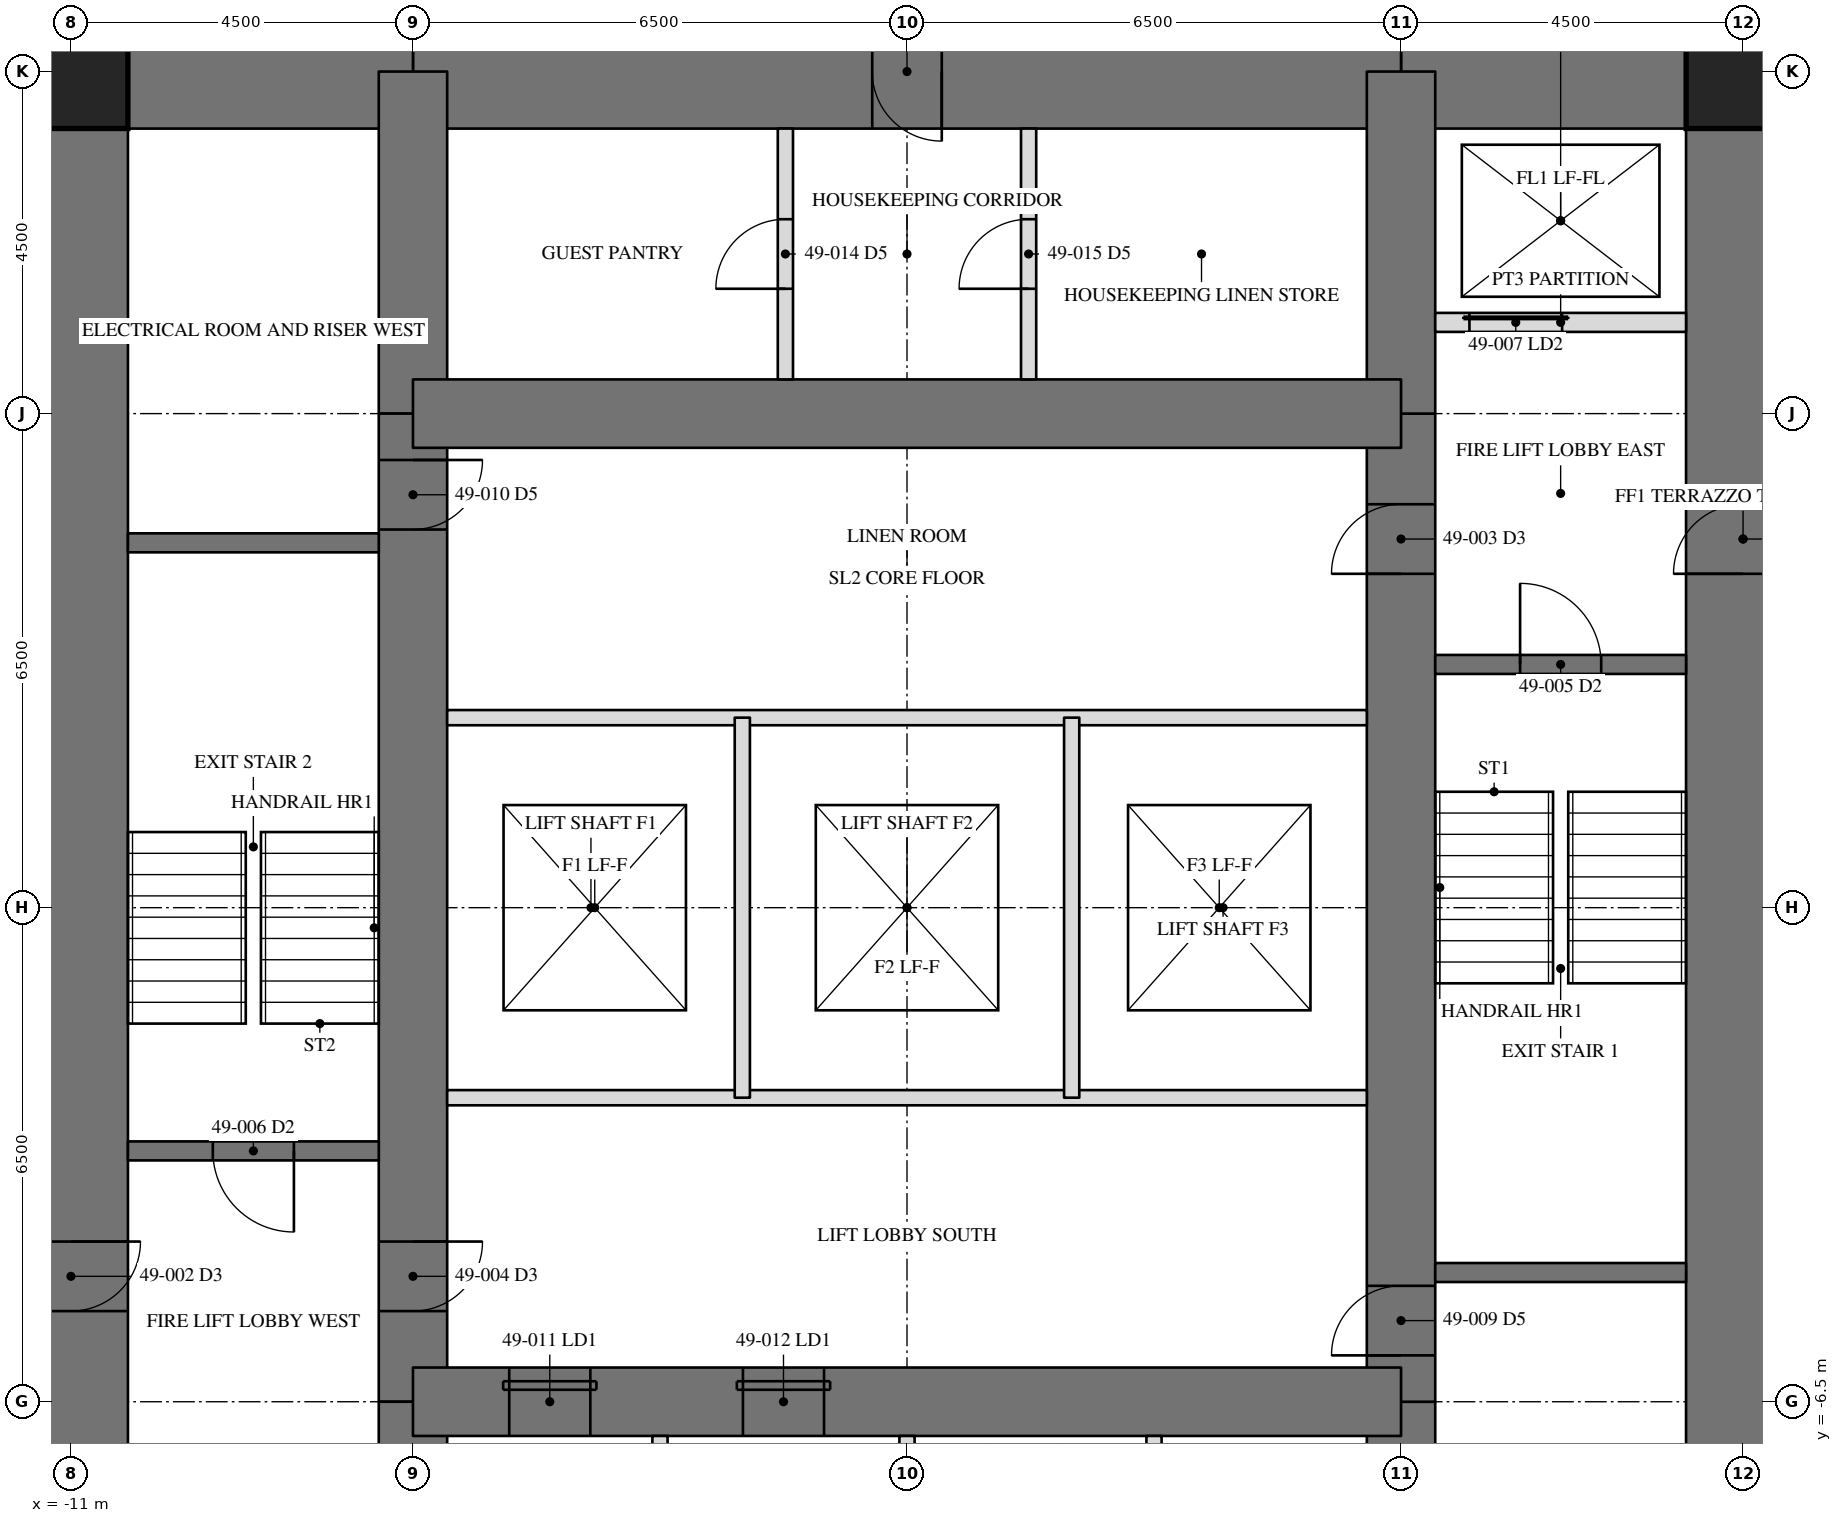
"""IFC4 building model, lengths in metres.
Left out: names, types, materials, properties, quantities, classifications, styles, units other than length and angle.
Written with IfcOpenShell. Run it as: python <this file> out.ifc"""

import sys

from ifc_helpers import new_model, si_unit, direction, frame, frame_2d, origin, origin_2d, place, context, subcontext, project, spatial, rectangle, hollow_rectangle, extrude, element, fill, save


model = new_model("IFC4")
c1 = context("Model", 3, precision=1e-05, world=origin(), true_north=direction((0.0, 1.0)))
c2 = subcontext(c1, "Body", "Model", "MODEL_VIEW")
j1 = project(units=[si_unit("LENGTHUNIT", "METRE"), si_unit("PLANEANGLEUNIT", "RADIAN")], contexts=[c1])
p1 = place(None, origin())
s1 = spatial("IfcSite", under=j1, at=p1, CompositionType="ELEMENT")
p2 = place(p1, origin())
s2 = spatial("IfcBuilding", under=s1, at=p2, CompositionType="ELEMENT")
p3 = place(p2, frame((0.0, 0.0, 208.2)))
s3 = spatial("IfcBuildingStorey", under=s2, at=p3, CompositionType="ELEMENT", Elevation=208.2)
p4 = place(p3, frame((11.0, -11.0, 0.0), z_axis=(0.0, 0.0, 1.0), x_axis=(0.0, 1.0, 0.0)))
e1 = element("IfcWall", 1, at=p4, inside=s3, PredefinedType="SHEAR", context=c2, shape_type="SweptSolid", body=[
    extrude(rectangle(XDim=22.0, YDim=1.5, at=frame_2d((11.0, 0.0))), origin(), (0.0, 0.0, 1.0), 3.5),
])
p5 = place(p4, frame((15.393, 0.0, 0.0)))
e2 = element("IfcOpeningElement", 2, at=p5, cuts=e1, PredefinedType="OPENING", context=c2, shape_type="SweptSolid", body=[
    extrude(rectangle(XDim=0.915, YDim=2.134, at=frame_2d((0.458, 1.067))), frame((0.0, 0.76, 0.0), z_axis=(0.0, -1.0, 0.0), x_axis=(1.0, 0.0, 0.0)), (0.0, 0.0, 1.0), 1.52),
])
p6 = place(p3, frame((-11.0, 11.0, 0.0), z_axis=(0.0, 0.0, 1.0), x_axis=(0.0, -1.0, 0.0)))
e3 = element("IfcWall", 3, at=p6, inside=s3, PredefinedType="SHEAR", context=c2, shape_type="SweptSolid", body=[
    extrude(rectangle(XDim=22.0, YDim=1.5, at=frame_2d((11.0, 0.0))), origin(), (0.0, 0.0, 1.0), 3.5),
])
p7 = place(p6, frame((15.393, 0.0, 0.0)))
e4 = element("IfcOpeningElement", 4, at=p7, cuts=e3, PredefinedType="OPENING", context=c2, shape_type="SweptSolid", body=[
    extrude(rectangle(XDim=0.915, YDim=2.134, at=frame_2d((0.458, 1.067))), frame((0.0, 0.76, 0.0), z_axis=(0.0, -1.0, 0.0), x_axis=(1.0, 0.0, 0.0)), (0.0, 0.0, 1.0), 1.52),
])
p8 = place(p3, frame((11.0, 11.0, 0.0), z_axis=(0.0, 0.0, 1.0), x_axis=(-1.0, 0.0, 0.0)))
e5 = element("IfcWall", 5, at=p8, inside=s3, PredefinedType="SHEAR", context=c2, shape_type="SweptSolid", body=[
    extrude(rectangle(XDim=4.5, YDim=1.5, at=frame_2d((2.25, 0.0))), origin(), (0.0, 0.0, 1.0), 3.5),
])
p9 = place(p3, frame((6.5, 11.0, 0.0), z_axis=(0.0, 0.0, 1.0), x_axis=(-1.0, 0.0, 0.0)))
e6 = element("IfcWall", 6, at=p9, inside=s3, PredefinedType="SHEAR", context=c2, shape_type="SweptSolid", body=[
    extrude(rectangle(XDim=13.0, YDim=1.5, at=frame_2d((6.5, 0.0))), origin(), (0.0, 0.0, 1.0), 3.5),
])
p10 = place(p9, frame((6.042, 0.0, 0.0)))
e7 = element("IfcOpeningElement", 7, at=p10, cuts=e6, PredefinedType="OPENING", context=c2, shape_type="SweptSolid", body=[
    extrude(rectangle(XDim=0.915, YDim=2.134, at=frame_2d((0.458, 1.067))), frame((0.0, 0.76, 0.0), z_axis=(0.0, -1.0, 0.0), x_axis=(1.0, 0.0, 0.0)), (0.0, 0.0, 1.0), 1.52),
])
p11 = place(p3, frame((-6.5, 11.0, 0.0), z_axis=(0.0, 0.0, 1.0), x_axis=(-1.0, 0.0, 0.0)))
e8 = element("IfcWall", 8, at=p11, inside=s3, PredefinedType="SHEAR", context=c2, shape_type="SweptSolid", body=[
    extrude(rectangle(XDim=4.5, YDim=1.5, at=frame_2d((2.25, 0.0))), origin(), (0.0, 0.0, 1.0), 3.5),
])
p12 = place(p3, frame((6.5, -11.0, 0.0), z_axis=(0.0, 0.0, 1.0), x_axis=(0.0, 1.0, 0.0)))
e9 = element("IfcWall", 9, at=p12, inside=s3, PredefinedType="SHEAR", context=c2, shape_type="SweptSolid", body=[
    extrude(rectangle(XDim=4.5, YDim=0.9, at=frame_2d((2.25, 0.0))), origin(), (0.0, 0.0, 1.0), 3.5),
])
p13 = place(p3, frame((6.5, -6.5, 0.0), z_axis=(0.0, 0.0, 1.0), x_axis=(0.0, 1.0, 0.0)))
e10 = element("IfcWall", 10, at=p13, inside=s3, PredefinedType="SHEAR", context=c2, shape_type="SweptSolid", body=[
    extrude(rectangle(XDim=13.0, YDim=0.9, at=frame_2d((6.5, 0.0))), origin(), (0.0, 0.0, 1.0), 3.5),
])
p14 = place(p13, frame((10.893, 0.0, 0.0)))
e11 = element("IfcOpeningElement", 11, at=p14, cuts=e10, PredefinedType="OPENING", context=c2, shape_type="SweptSolid", body=[
    extrude(rectangle(XDim=0.915, YDim=2.134, at=frame_2d((0.458, 1.067))), frame((0.0, 0.46, 0.0), z_axis=(0.0, -1.0, 0.0), x_axis=(1.0, 0.0, 0.0)), (0.0, 0.0, 1.0), 0.92),
])
p15 = place(p13, frame((0.61, 0.0, 0.0)))
e12 = element("IfcOpeningElement", 12, at=p15, cuts=e10, PredefinedType="OPENING", context=c2, shape_type="SweptSolid", body=[
    extrude(rectangle(XDim=0.915, YDim=2.134, at=frame_2d((0.458, 1.067))), frame((0.0, 0.46, 0.0), z_axis=(0.0, -1.0, 0.0), x_axis=(1.0, 0.0, 0.0)), (0.0, 0.0, 1.0), 0.92),
])
for number, where, z_axis, x_axis in (
    (13, (6.5, 6.5, 0.0), (0.0, 0.0, 1.0), (0.0, 1.0, 0.0)),
    (14, (-6.5, 11.0, 0.0), (0.0, 0.0, 1.0), (0.0, -1.0, 0.0)),
):
    element("IfcWall", number, at=place(p3, frame(where, z_axis=z_axis, x_axis=x_axis)), inside=s3, PredefinedType="SHEAR", context=c2, shape_type="SweptSolid", body=[
        extrude(rectangle(XDim=4.5, YDim=0.9, at=frame_2d((2.25, 0.0))), origin(), (0.0, 0.0, 1.0), 3.5),
    ])
p16 = place(p3, frame((-6.5, 6.5, 0.0), z_axis=(0.0, 0.0, 1.0), x_axis=(0.0, -1.0, 0.0)))
e15 = element("IfcWall", 15, at=p16, inside=s3, PredefinedType="SHEAR", context=c2, shape_type="SweptSolid", body=[
    extrude(rectangle(XDim=13.0, YDim=0.9, at=frame_2d((6.5, 0.0))), origin(), (0.0, 0.0, 1.0), 3.5),
])
p17 = place(p16, frame((10.893, 0.0, 0.0)))
e16 = element("IfcOpeningElement", 16, at=p17, cuts=e15, PredefinedType="OPENING", context=c2, shape_type="SweptSolid", body=[
    extrude(rectangle(XDim=0.915, YDim=2.134, at=frame_2d((0.458, 1.067))), frame((0.0, 0.46, 0.0), z_axis=(0.0, -1.0, 0.0), x_axis=(1.0, 0.0, 0.0)), (0.0, 0.0, 1.0), 0.92),
])
p18 = place(p16, frame((0.61, 0.0, 0.0)))
e17 = element("IfcOpeningElement", 17, at=p18, cuts=e15, PredefinedType="OPENING", context=c2, shape_type="SweptSolid", body=[
    extrude(rectangle(XDim=0.915, YDim=2.134, at=frame_2d((0.458, 1.067))), frame((0.0, 0.46, 0.0), z_axis=(0.0, -1.0, 0.0), x_axis=(1.0, 0.0, 0.0)), (0.0, 0.0, 1.0), 0.92),
])
p19 = place(p3, frame((-6.5, -6.5, 0.0), z_axis=(0.0, 0.0, 1.0), x_axis=(0.0, -1.0, 0.0)))
e18 = element("IfcWall", 18, at=p19, inside=s3, PredefinedType="SHEAR", context=c2, shape_type="SweptSolid", body=[
    extrude(rectangle(XDim=4.5, YDim=0.9, at=frame_2d((2.25, 0.0))), origin(), (0.0, 0.0, 1.0), 3.5),
])
p20 = place(p3, frame((6.5, 6.5, 0.0), z_axis=(0.0, 0.0, 1.0), x_axis=(-1.0, 0.0, 0.0)))
e19 = element("IfcWall", 19, at=p20, inside=s3, PredefinedType="SHEAR", context=c2, shape_type="SweptSolid", body=[
    extrude(rectangle(XDim=13.0, YDim=0.9, at=frame_2d((6.5, 0.0))), origin(), (0.0, 0.0, 1.0), 3.5),
])
p21 = place(p3, frame((-6.5, -6.5, 0.0), z_axis=(0.0, 0.0, 1.0), x_axis=(1.0, 0.0, 0.0)))
e20 = element("IfcWall", 20, at=p21, inside=s3, PredefinedType="SHEAR", context=c2, shape_type="SweptSolid", body=[
    extrude(rectangle(XDim=13.0, YDim=0.9, at=frame_2d((6.5, 0.0))), origin(), (0.0, 0.0, 1.0), 3.5),
])
p22 = place(p21, frame((1.267, 0.0, 0.0)))
e21 = element("IfcOpeningElement", 21, at=p22, cuts=e20, PredefinedType="OPENING", context=c2, shape_type="SweptSolid", body=[
    extrude(rectangle(XDim=1.067, YDim=2.134, at=frame_2d((0.533, 1.067))), frame((0.0, 0.46, 0.0), z_axis=(0.0, -1.0, 0.0), x_axis=(1.0, 0.0, 0.0)), (0.0, 0.0, 1.0), 0.92),
])
p23 = place(p21, frame((4.342, 0.0, 0.0)))
e22 = element("IfcOpeningElement", 22, at=p23, cuts=e20, PredefinedType="OPENING", context=c2, shape_type="SweptSolid", body=[
    extrude(rectangle(XDim=1.067, YDim=2.134, at=frame_2d((0.533, 1.067))), frame((0.0, 0.46, 0.0), z_axis=(0.0, -1.0, 0.0), x_axis=(1.0, 0.0, 0.0)), (0.0, 0.0, 1.0), 0.92),
])
for number, where, z_axis, x_axis in (
    (23, (11.0, 11.0, 0.0), (0.0, 0.0, 1.0), (1.0, 0.0, 0.0)),
    (24, (-11.0, 11.0, 0.0), (0.0, 0.0, 1.0), (1.0, 0.0, 0.0)),
):
    element("IfcColumn", number, at=place(p3, frame(where, z_axis=z_axis, x_axis=x_axis)), inside=s3, PredefinedType="COLUMN", context=c2, shape_type="SweptSolid", body=[
        extrude(hollow_rectangle(XDim=1.499, YDim=1.499, WallThickness=0.102, at=origin_2d()), origin(), (0.0, 0.0, 1.0), 3.5),
    ])
for number, where, z_axis, x_axis in (
    (25, (6.95, -4.8, 0.0), (0.0, 0.0, 1.0), (1.0, 0.0, 0.0)),
    (26, (-6.95, 4.8, 0.0), (0.0, 0.0, 1.0), (-1.0, 0.0, 0.0)),
):
    element("IfcWall", number, at=place(p3, frame(where, z_axis=z_axis, x_axis=x_axis)), inside=s3, PredefinedType="SOLIDWALL", context=c2, shape_type="SweptSolid", body=[
        extrude(rectangle(XDim=3.3, YDim=0.25, at=frame_2d((1.65, 0.0))), origin(), (0.0, 0.0, 1.0), 3.31),
    ])
p24 = place(p3, frame((6.95, 3.2, 0.0), z_axis=(0.0, 0.0, 1.0), x_axis=(1.0, 0.0, 0.0)))
e27 = element("IfcWall", 27, at=p24, inside=s3, PredefinedType="SOLIDWALL", context=c2, shape_type="SweptSolid", body=[
    extrude(rectangle(XDim=3.3, YDim=0.25, at=frame_2d((1.65, 0.0))), origin(), (0.0, 0.0, 1.0), 3.31),
])
p25 = place(p24, frame((1.116, 0.0, 0.0)))
e28 = element("IfcOpeningElement", 28, at=p25, cuts=e27, PredefinedType="OPENING", context=c2, shape_type="SweptSolid", body=[
    extrude(rectangle(XDim=1.067, YDim=2.134, at=frame_2d((0.533, 1.067))), frame((0.0, 0.135, 0.0), z_axis=(0.0, -1.0, 0.0), x_axis=(1.0, 0.0, 0.0)), (0.0, 0.0, 1.0), 0.27),
])
p26 = place(p3, frame((-6.95, -3.2, 0.0), z_axis=(0.0, 0.0, 1.0), x_axis=(-1.0, 0.0, 0.0)))
e29 = element("IfcWall", 29, at=p26, inside=s3, PredefinedType="SOLIDWALL", context=c2, shape_type="SweptSolid", body=[
    extrude(rectangle(XDim=3.3, YDim=0.25, at=frame_2d((1.65, 0.0))), origin(), (0.0, 0.0, 1.0), 3.31),
])
p27 = place(p26, frame((1.116, 0.0, 0.0)))
e30 = element("IfcOpeningElement", 30, at=p27, cuts=e29, PredefinedType="OPENING", context=c2, shape_type="SweptSolid", body=[
    extrude(rectangle(XDim=1.067, YDim=2.134, at=frame_2d((0.533, 1.067))), frame((0.0, 0.135, 0.0), z_axis=(0.0, -1.0, 0.0), x_axis=(1.0, 0.0, 0.0)), (0.0, 0.0, 1.0), 0.27),
])
p28 = place(p3, frame((6.95, 7.7, 0.0), z_axis=(0.0, 0.0, 1.0), x_axis=(1.0, 0.0, 0.0)))
e31 = element("IfcWall", 31, at=p28, inside=s3, PredefinedType="PARTITIONING", context=c2, shape_type="SweptSolid", body=[
    extrude(rectangle(XDim=3.3, YDim=0.25, at=frame_2d((1.65, 0.0))), origin(), (0.0, 0.0, 1.0), 3.31),
])
p29 = place(p28, frame((0.45, 0.0, 0.0)))
e32 = element("IfcOpeningElement", 32, at=p29, cuts=e31, PredefinedType="OPENING", context=c2, shape_type="SweptSolid", body=[
    extrude(rectangle(XDim=1.219, YDim=2.134, at=frame_2d((0.609, 1.067))), frame((0.0, 0.135, 0.0), z_axis=(0.0, -1.0, 0.0), x_axis=(1.0, 0.0, 0.0)), (0.0, 0.0, 1.0), 0.27),
])
for number, where, z_axis, x_axis in (
    (33, (-6.05, 2.5, 0.0), (0.0, 0.0, 1.0), (1.0, 0.0, 0.0)),
    (34, (6.05, -2.5, 0.0), (0.0, 0.0, 1.0), (-1.0, 0.0, 0.0)),
):
    element("IfcWall", number, at=place(p3, frame(where, z_axis=z_axis, x_axis=x_axis)), inside=s3, PredefinedType="PARTITIONING", context=c2, shape_type="SweptSolid", body=[
        extrude(rectangle(XDim=12.1, YDim=0.2, at=frame_2d((6.05, 0.0))), origin(), (0.0, 0.0, 1.0), 3.31),
    ])
for number, where, z_axis, x_axis in (
    (35, (-3.25, -10.25, 0.0), (0.0, 0.0, 1.0), (0.0, 1.0, 0.0)),
    (36, (0.0, -10.25, 0.0), (0.0, 0.0, 1.0), (0.0, 1.0, 0.0)),
    (37, (3.25, -10.25, 0.0), (0.0, 0.0, 1.0), (0.0, 1.0, 0.0)),
):
    element("IfcWall", number, at=place(p3, frame(where, z_axis=z_axis, x_axis=x_axis)), inside=s3, PredefinedType="PARTITIONING", context=c2, shape_type="SweptSolid", body=[
        extrude(rectangle(XDim=3.3, YDim=0.2, at=frame_2d((1.65, 0.0))), origin(), (0.0, 0.0, 1.0), 3.31),
    ])
for number, where, z_axis, x_axis in (
    (38, (-2.167, -2.5, 0.0), (0.0, 0.0, 1.0), (0.0, 1.0, 0.0)),
    (39, (2.167, -2.5, 0.0), (0.0, 0.0, 1.0), (0.0, 1.0, 0.0)),
):
    element("IfcWall", number, at=place(p3, frame(where, z_axis=z_axis, x_axis=x_axis)), inside=s3, PredefinedType="PARTITIONING", context=c2, shape_type="SweptSolid", body=[
        extrude(rectangle(XDim=5.0, YDim=0.2, at=frame_2d((2.5, 0.0))), origin(), (0.0, 0.0, 1.0), 3.31),
    ])
p30 = place(p3, frame((-1.6, 6.95, 0.0), z_axis=(0.0, 0.0, 1.0), x_axis=(0.0, 1.0, 0.0)))
e40 = element("IfcWall", 40, at=p30, inside=s3, PredefinedType="PARTITIONING", context=c2, shape_type="SweptSolid", body=[
    extrude(rectangle(XDim=3.3, YDim=0.2, at=frame_2d((1.65, 0.0))), origin(), (0.0, 0.0, 1.0), 3.31),
])
p31 = place(p30, frame((1.192, 0.0, 0.0)))
e41 = element("IfcOpeningElement", 41, at=p31, cuts=e40, PredefinedType="OPENING", context=c2, shape_type="SweptSolid", body=[
    extrude(rectangle(XDim=0.915, YDim=2.134, at=frame_2d((0.458, 1.067))), frame((0.0, 0.11, 0.0), z_axis=(0.0, -1.0, 0.0), x_axis=(1.0, 0.0, 0.0)), (0.0, 0.0, 1.0), 0.22),
])
p32 = place(p3, frame((1.6, 6.95, 0.0), z_axis=(0.0, 0.0, 1.0), x_axis=(0.0, 1.0, 0.0)))
e42 = element("IfcWall", 42, at=p32, inside=s3, PredefinedType="PARTITIONING", context=c2, shape_type="SweptSolid", body=[
    extrude(rectangle(XDim=3.3, YDim=0.2, at=frame_2d((1.65, 0.0))), origin(), (0.0, 0.0, 1.0), 3.31),
])
p33 = place(p32, frame((1.192, 0.0, 0.0)))
e43 = element("IfcOpeningElement", 43, at=p33, cuts=e42, PredefinedType="OPENING", context=c2, shape_type="SweptSolid", body=[
    extrude(rectangle(XDim=0.915, YDim=2.134, at=frame_2d((0.458, 1.067))), frame((0.0, 0.11, 0.0), z_axis=(0.0, -1.0, 0.0), x_axis=(1.0, 0.0, 0.0)), (0.0, 0.0, 1.0), 0.22),
])
p34 = place(p14, origin())
e44 = element("IfcDoor", 44, at=p34, inside=s3, OperationType="SINGLE_SWING_RIGHT", PredefinedType="DOOR", context=c2, shape_type="SweptSolid", body=[
    extrude(rectangle(XDim=0.915, YDim=2.134, at=frame_2d((0.458, 1.067))), frame((0.0, -0.375, 0.0), z_axis=(0.0, -1.0, 0.0), x_axis=(1.0, 0.0, 0.0)), (0.0, 0.0, 1.0), 0.05),
])
fill(e11, e44)
p35 = place(p17, origin())
e45 = element("IfcDoor", 45, at=p35, inside=s3, OperationType="SINGLE_SWING_RIGHT", PredefinedType="DOOR", context=c2, shape_type="SweptSolid", body=[
    extrude(rectangle(XDim=0.915, YDim=2.134, at=frame_2d((0.458, 1.067))), frame((0.0, -0.375, 0.0), z_axis=(0.0, -1.0, 0.0), x_axis=(1.0, 0.0, 0.0)), (0.0, 0.0, 1.0), 0.05),
])
fill(e16, e45)
p36 = place(p25, origin())
e46 = element("IfcDoor", 46, at=p36, inside=s3, OperationType="SINGLE_SWING_LEFT", PredefinedType="DOOR", context=c2, shape_type="SweptSolid", body=[
    extrude(rectangle(XDim=1.067, YDim=2.134, at=frame_2d((0.533, 1.067))), frame((0.0, 0.025, 0.0), z_axis=(0.0, -1.0, 0.0), x_axis=(1.0, 0.0, 0.0)), (0.0, 0.0, 1.0), 0.05),
])
fill(e28, e46)
p37 = place(p27, origin())
e47 = element("IfcDoor", 47, at=p37, inside=s3, OperationType="SINGLE_SWING_LEFT", PredefinedType="DOOR", context=c2, shape_type="SweptSolid", body=[
    extrude(rectangle(XDim=1.067, YDim=2.134, at=frame_2d((0.533, 1.067))), frame((0.0, 0.025, 0.0), z_axis=(0.0, -1.0, 0.0), x_axis=(1.0, 0.0, 0.0)), (0.0, 0.0, 1.0), 0.05),
])
fill(e30, e47)
p38 = place(p29, origin())
e48 = element("IfcDoor", 48, at=p38, inside=s3, OperationType="SLIDING_TO_LEFT", PredefinedType="DOOR", context=c2, shape_type="SweptSolid", body=[
    extrude(rectangle(XDim=1.219, YDim=2.134, at=frame_2d((0.609, 1.067))), frame((0.0, 0.025, 0.0), z_axis=(0.0, -1.0, 0.0), x_axis=(1.0, 0.0, 0.0)), (0.0, 0.0, 1.0), 0.05),
])
fill(e32, e48)
p39 = place(p15, origin())
e49 = element("IfcDoor", 49, at=p39, inside=s3, OperationType="SINGLE_SWING_RIGHT", PredefinedType="DOOR", context=c2, shape_type="SweptSolid", body=[
    extrude(rectangle(XDim=0.915, YDim=2.134, at=frame_2d((0.458, 1.067))), frame((0.0, -0.375, 0.0), z_axis=(0.0, -1.0, 0.0), x_axis=(1.0, 0.0, 0.0)), (0.0, 0.0, 1.0), 0.05),
])
fill(e12, e49)
p40 = place(p18, origin())
e50 = element("IfcDoor", 50, at=p40, inside=s3, OperationType="SINGLE_SWING_RIGHT", PredefinedType="DOOR", context=c2, shape_type="SweptSolid", body=[
    extrude(rectangle(XDim=0.915, YDim=2.134, at=frame_2d((0.458, 1.067))), frame((0.0, -0.375, 0.0), z_axis=(0.0, -1.0, 0.0), x_axis=(1.0, 0.0, 0.0)), (0.0, 0.0, 1.0), 0.05),
])
fill(e17, e50)
p41 = place(p22, origin())
e51 = element("IfcDoor", 51, at=p41, inside=s3, OperationType="SLIDING_TO_LEFT", PredefinedType="DOOR", context=c2, shape_type="SweptSolid", body=[
    extrude(rectangle(XDim=1.067, YDim=2.134, at=frame_2d((0.533, 1.067))), frame((0.0, -0.375, 0.0), z_axis=(0.0, -1.0, 0.0), x_axis=(1.0, 0.0, 0.0)), (0.0, 0.0, 1.0), 0.05),
])
fill(e21, e51)
p42 = place(p23, origin())
e52 = element("IfcDoor", 52, at=p42, inside=s3, OperationType="SLIDING_TO_LEFT", PredefinedType="DOOR", context=c2, shape_type="SweptSolid", body=[
    extrude(rectangle(XDim=1.067, YDim=2.134, at=frame_2d((0.533, 1.067))), frame((0.0, -0.375, 0.0), z_axis=(0.0, -1.0, 0.0), x_axis=(1.0, 0.0, 0.0)), (0.0, 0.0, 1.0), 0.05),
])
fill(e22, e52)
p43 = place(p10, origin())
e53 = element("IfcDoor", 53, at=p43, inside=s3, OperationType="SINGLE_SWING_RIGHT", PredefinedType="DOOR", context=c2, shape_type="SweptSolid", body=[
    extrude(rectangle(XDim=0.915, YDim=2.134, at=frame_2d((0.458, 1.067))), frame((0.0, 0.025, 0.0), z_axis=(0.0, -1.0, 0.0), x_axis=(1.0, 0.0, 0.0)), (0.0, 0.0, 1.0), 0.05),
])
fill(e7, e53)
p44 = place(p31, origin())
e54 = element("IfcDoor", 54, at=p44, inside=s3, OperationType="SINGLE_SWING_RIGHT", PredefinedType="DOOR", context=c2, shape_type="SweptSolid", body=[
    extrude(rectangle(XDim=0.915, YDim=2.134, at=frame_2d((0.458, 1.067))), frame((0.0, 0.025, 0.0), z_axis=(0.0, -1.0, 0.0), x_axis=(1.0, 0.0, 0.0)), (0.0, 0.0, 1.0), 0.05),
])
fill(e41, e54)
p45 = place(p33, origin())
e55 = element("IfcDoor", 55, at=p45, inside=s3, OperationType="SINGLE_SWING_RIGHT", PredefinedType="DOOR", context=c2, shape_type="SweptSolid", body=[
    extrude(rectangle(XDim=0.915, YDim=2.134, at=frame_2d((0.458, 1.067))), frame((0.0, 0.025, 0.0), z_axis=(0.0, -1.0, 0.0), x_axis=(1.0, 0.0, 0.0)), (0.0, 0.0, 1.0), 0.05),
])
fill(e43, e55)
save(model, sys.argv[1])
